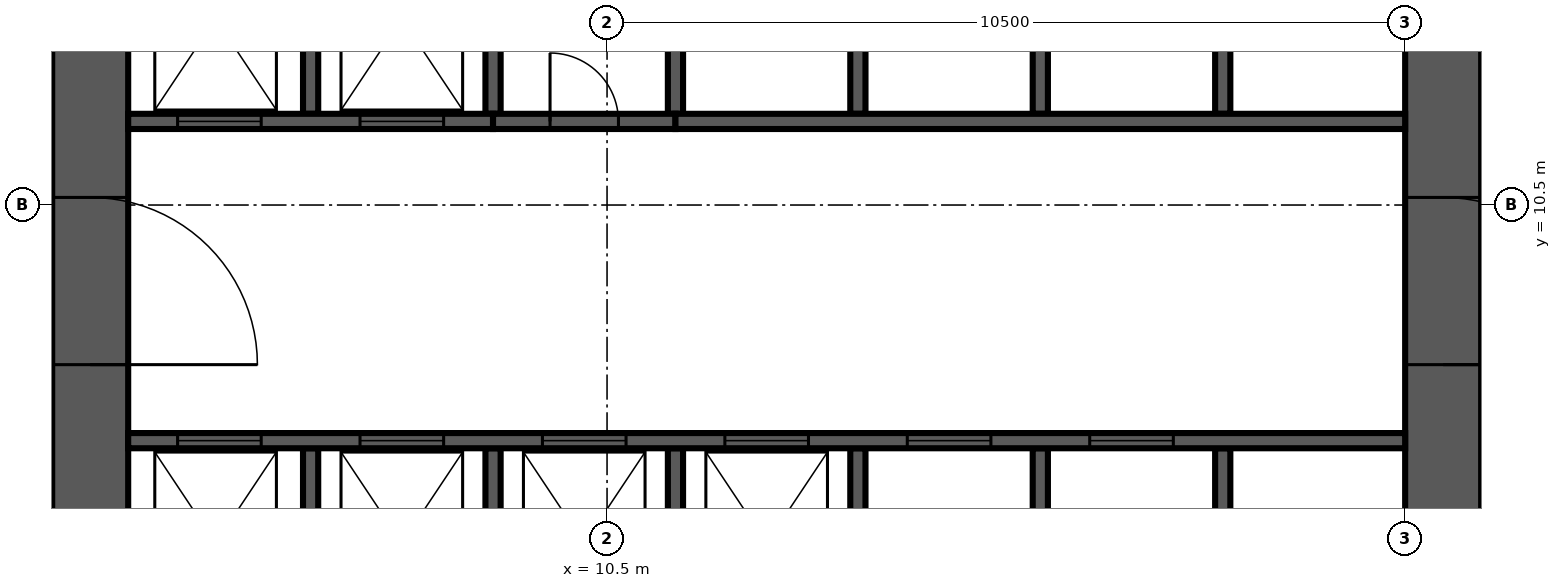
"""IFC4 building model, lengths in metres.
Left out: names, types, materials, properties, quantities, classifications, styles, units other than length and angle.
Written with IfcOpenShell. Run it as: python <this file> out.ifc"""

import sys

from ifc_helpers import new_model, si_unit, direction, frame, frame_2d, origin, place, context, subcontext, project, spatial, rectangle, extrude, source, transform, mapped, element, fill, save


model = new_model("IFC4")
c1 = context("Model", 3, precision=1e-05, world=origin(), true_north=direction((0.0, 1.0)))
c2 = subcontext(c1, "Body", "Model", "MODEL_VIEW")
j1 = project(units=[si_unit("LENGTHUNIT", "METRE"), si_unit("PLANEANGLEUNIT", "RADIAN")], contexts=[c1])
p1 = place(None, origin())
s1 = spatial("IfcSite", under=j1, at=p1, CompositionType="ELEMENT")
p2 = place(p1, origin())
s2 = spatial("IfcBuilding", under=s1, at=p2, CompositionType="ELEMENT")
p3 = place(p2, frame((0.0, 0.0, 170.3)))
s3 = spatial("IfcBuildingStorey", under=s2, at=p3, CompositionType="ELEMENT", Elevation=170.3)
p4 = place(p3, frame((3.7, 4.2, 0.0), z_axis=(0.0, 0.0, 1.0), x_axis=(0.0, 1.0, 0.0)))
e1 = element("IfcWall", 1, at=p4, inside=s3, PredefinedType="SHEAR", context=c2, shape_type="SweptSolid", body=[
    extrude(rectangle(XDim=17.8, YDim=1.0, at=frame_2d((8.9, 0.0))), origin(), (0.0, 0.0, 1.0), 7.5),
])
m1 = source(origin(), c2, "Body", "SweptSolid", [
    extrude(rectangle(XDim=2.2, YDim=2.1, at=frame_2d((1.1, 1.05))), frame((0.0, 0.51, 0.0), z_axis=(0.0, -1.0, 0.0), x_axis=(1.0, 0.0, 0.0)), (0.0, 0.0, 1.0), 1.02),
])
p5 = place(p4, frame((4.2, 0.0, 0.0)))
e2 = element("IfcOpeningElement", 2, at=p5, cuts=e1, PredefinedType="OPENING", context=c2, shape_type="MappedRepresentation", body=[
    mapped(m1, transform((0.0, 0.0, 0.0), scale=1.0)),
])
p6 = place(p3, frame((21.5, 4.2, 0.0), z_axis=(0.0, 0.0, 1.0), x_axis=(0.0, 1.0, 0.0)))
e3 = element("IfcWall", 3, at=p6, inside=s3, PredefinedType="SHEAR", context=c2, shape_type="SweptSolid", body=[
    extrude(rectangle(XDim=16.8, YDim=1.0, at=frame_2d((8.4, 0.0))), origin(), (0.0, 0.0, 1.0), 7.5),
])
p7 = place(p6, frame((4.2, 0.0, 0.0)))
e4 = element("IfcOpeningElement", 4, at=p7, cuts=e3, PredefinedType="OPENING", context=c2, shape_type="MappedRepresentation", body=[
    mapped(m1, transform((0.0, 0.0, 0.0), scale=1.0)),
])
m2 = source(origin(), c2, "Body", "SweptSolid", [
    extrude(rectangle(XDim=1.2, YDim=2.1, at=frame_2d((0.6, 1.05))), frame((0.0, 0.51, 0.0), z_axis=(0.0, -1.0, 0.0), x_axis=(1.0, 0.0, 0.0)), (0.0, 0.0, 1.0), 1.02),
])
p8 = place(p6, frame((14.7, 0.0, 0.0)))
e5 = element("IfcOpeningElement", 5, at=p8, cuts=e3, PredefinedType="OPENING", context=c2, shape_type="MappedRepresentation", body=[
    mapped(m2, transform((0.0, 0.0, 0.0), scale=1.0)),
])
m3 = source(origin(), c2, "Body", "SweptSolid", [
    extrude(rectangle(XDim=3.1, YDim=0.2, at=frame_2d((1.55, 0.0))), origin(), (0.0, 0.0, 1.0), 7.5),
])
for number, where, z_axis, x_axis in (
    (6, (6.6, 4.2, 0.0), (0.0, 0.0, 1.0), (0.0, 1.0, 0.0)),
    (7, (9.0, 4.2, 0.0), (0.0, 0.0, 1.0), (0.0, 1.0, 0.0)),
    (8, (11.4, 4.2, 0.0), (0.0, 0.0, 1.0), (0.0, 1.0, 0.0)),
    (9, (13.8, 4.2, 0.0), (0.0, 0.0, 1.0), (0.0, 1.0, 0.0)),
    (10, (16.2, 4.2, 0.0), (0.0, 0.0, 1.0), (0.0, 1.0, 0.0)),
    (11, (18.6, 4.2, 0.0), (0.0, 0.0, 1.0), (0.0, 1.0, 0.0)),
):
    element("IfcWall", number, at=place(p3, frame(where, z_axis=z_axis, x_axis=x_axis)), inside=s3, PredefinedType="SOLIDWALL", context=c2, shape_type="MappedRepresentation", body=[
        mapped(m3, transform((0.0, 0.0, 0.0), scale=1.0)),
    ])
m4 = source(origin(), c2, "Body", "SweptSolid", [
    extrude(rectangle(XDim=3.0, YDim=0.2, at=frame_2d((1.5, 0.0))), origin(), (0.0, 0.0, 1.0), 7.5),
])
p9 = place(p3, frame((6.6, 11.7, 0.0), z_axis=(0.0, 0.0, 1.0), x_axis=(0.0, 1.0, 0.0)))
e12 = element("IfcWall", 12, at=p9, inside=s3, PredefinedType="SOLIDWALL", context=c2, shape_type="MappedRepresentation", body=[
    mapped(m4, transform((0.0, 0.0, 0.0), scale=1.0)),
])
p10 = place(p3, frame((9.0, 11.7, 0.0), z_axis=(0.0, 0.0, 1.0), x_axis=(0.0, 1.0, 0.0)))
e13 = element("IfcWall", 13, at=p10, inside=s3, PredefinedType="SOLIDWALL", context=c2, shape_type="SweptSolid", body=[
    extrude(rectangle(XDim=3.0, YDim=0.2, at=frame_2d((1.5, 0.0))), origin(), (0.0, 0.0, 1.0), 7.1),
])
m5 = source(origin(), c2, "Body", "SweptSolid", [
    extrude(rectangle(XDim=3.0, YDim=0.2, at=frame_2d((1.5, 0.0))), origin(), (0.0, 0.0, 1.0), 7.1),
])
p11 = place(p3, frame((11.4, 11.7, 0.0), z_axis=(0.0, 0.0, 1.0), x_axis=(0.0, 1.0, 0.0)))
e14 = element("IfcWall", 14, at=p11, inside=s3, PredefinedType="SOLIDWALL", context=c2, shape_type="MappedRepresentation", body=[
    mapped(m5, transform((0.0, 0.0, 0.0), scale=1.0)),
])
for number, where, z_axis, x_axis in (
    (15, (13.8, 11.7, 0.0), (0.0, 0.0, 1.0), (0.0, 1.0, 0.0)),
    (16, (16.2, 11.7, 0.0), (0.0, 0.0, 1.0), (0.0, 1.0, 0.0)),
    (17, (18.6, 11.7, 0.0), (0.0, 0.0, 1.0), (0.0, 1.0, 0.0)),
):
    element("IfcWall", number, at=place(p3, frame(where, z_axis=z_axis, x_axis=x_axis)), inside=s3, PredefinedType="SOLIDWALL", context=c2, shape_type="MappedRepresentation", body=[
        mapped(m4, transform((0.0, 0.0, 0.0), scale=1.0)),
    ])
m6 = source(origin(), c2, "Body", "SweptSolid", [
    extrude(rectangle(XDim=16.8, YDim=0.2, at=frame_2d((8.4, 0.0))), origin(), (0.0, 0.0, 1.0), 7.5),
])
p12 = place(p3, frame((4.2, 7.4, 0.0), z_axis=(0.0, 0.0, 1.0), x_axis=(1.0, 0.0, 0.0)))
e18 = element("IfcWall", 18, at=p12, inside=s3, PredefinedType="SOLIDWALL", context=c2, shape_type="MappedRepresentation", body=[
    mapped(m6, transform((0.0, 0.0, 0.0), scale=1.0)),
])
m7 = source(origin(), c2, "Body", "SweptSolid", [
    extrude(rectangle(XDim=1.1, YDim=2.1, at=frame_2d((0.55, 1.05))), frame((0.0, 0.11, 0.0), z_axis=(0.0, -1.0, 0.0), x_axis=(1.0, 0.0, 0.0)), (0.0, 0.0, 1.0), 0.22),
])
p13 = place(p12, frame((0.65, 0.0, 0.0)))
e19 = element("IfcOpeningElement", 19, at=p13, cuts=e18, PredefinedType="OPENING", context=c2, shape_type="MappedRepresentation", body=[
    mapped(m7, transform((0.0, 0.0, 0.0), scale=1.0)),
])
p14 = place(p12, frame((3.05, 0.0, 0.0)))
e20 = element("IfcOpeningElement", 20, at=p14, cuts=e18, PredefinedType="OPENING", context=c2, shape_type="MappedRepresentation", body=[
    mapped(m7, transform((0.0, 0.0, 0.0), scale=1.0)),
])
p15 = place(p12, frame((5.45, 0.0, 0.0)))
e21 = element("IfcOpeningElement", 21, at=p15, cuts=e18, PredefinedType="OPENING", context=c2, shape_type="MappedRepresentation", body=[
    mapped(m7, transform((0.0, 0.0, 0.0), scale=1.0)),
])
p16 = place(p12, frame((7.85, 0.0, 0.0)))
e22 = element("IfcOpeningElement", 22, at=p16, cuts=e18, PredefinedType="OPENING", context=c2, shape_type="MappedRepresentation", body=[
    mapped(m7, transform((0.0, 0.0, 0.0), scale=1.0)),
])
p17 = place(p12, frame((10.25, 0.0, 0.0)))
e23 = element("IfcOpeningElement", 23, at=p17, cuts=e18, PredefinedType="OPENING", context=c2, shape_type="MappedRepresentation", body=[
    mapped(m7, transform((0.0, 0.0, 0.0), scale=1.0)),
])
p18 = place(p12, frame((12.65, 0.0, 0.0)))
e24 = element("IfcOpeningElement", 24, at=p18, cuts=e18, PredefinedType="OPENING", context=c2, shape_type="MappedRepresentation", body=[
    mapped(m7, transform((0.0, 0.0, 0.0), scale=1.0)),
])
p19 = place(p3, frame((4.2, 11.6, 0.0), z_axis=(0.0, 0.0, 1.0), x_axis=(1.0, 0.0, 0.0)))
e25 = element("IfcWall", 25, at=p19, inside=s3, PredefinedType="SOLIDWALL", context=c2, shape_type="SweptSolid", body=[
    extrude(rectangle(XDim=4.8, YDim=0.2, at=frame_2d((2.4, 0.0))), origin(), (0.0, 0.0, 1.0), 7.5),
])
p20 = place(p19, frame((0.65, 0.0, 0.0)))
e26 = element("IfcOpeningElement", 26, at=p20, cuts=e25, PredefinedType="OPENING", context=c2, shape_type="MappedRepresentation", body=[
    mapped(m7, transform((0.0, 0.0, 0.0), scale=1.0)),
])
p21 = place(p19, frame((3.05, 0.0, 0.0)))
e27 = element("IfcOpeningElement", 27, at=p21, cuts=e25, PredefinedType="OPENING", context=c2, shape_type="MappedRepresentation", body=[
    mapped(m7, transform((0.0, 0.0, 0.0), scale=1.0)),
])
p22 = place(p3, frame((9.0, 11.6, 0.0), z_axis=(0.0, 0.0, 1.0), x_axis=(1.0, 0.0, 0.0)))
e28 = element("IfcWall", 28, at=p22, inside=s3, PredefinedType="SOLIDWALL", context=c2, shape_type="SweptSolid", body=[
    extrude(rectangle(XDim=2.4, YDim=0.2, at=frame_2d((1.2, 0.0))), origin(), (0.0, 0.0, 1.0), 7.1),
])
m8 = source(origin(), c2, "Body", "SweptSolid", [
    extrude(rectangle(XDim=0.9, YDim=2.1, at=frame_2d((0.45, 1.05))), frame((0.0, 0.11, 0.0), z_axis=(0.0, -1.0, 0.0), x_axis=(1.0, 0.0, 0.0)), (0.0, 0.0, 1.0), 0.22),
])
p23 = place(p22, frame((0.75, 0.0, 0.0)))
e29 = element("IfcOpeningElement", 29, at=p23, cuts=e28, PredefinedType="OPENING", context=c2, shape_type="MappedRepresentation", body=[
    mapped(m8, transform((0.0, 0.0, 0.0), scale=1.0)),
])
p24 = place(p3, frame((11.4, 11.6, 0.0), z_axis=(0.0, 0.0, 1.0), x_axis=(1.0, 0.0, 0.0)))
e30 = element("IfcWall", 30, at=p24, inside=s3, PredefinedType="SOLIDWALL", context=c2, shape_type="SweptSolid", body=[
    extrude(rectangle(XDim=9.6, YDim=0.2, at=frame_2d((4.8, 0.0))), origin(), (0.0, 0.0, 1.0), 7.5),
])
m9 = source(origin(), c2, "Body", "SweptSolid", [
    extrude(rectangle(XDim=1.1, YDim=2.1, at=frame_2d((0.55, 1.05))), frame((0.0, 0.025, 0.0), z_axis=(0.0, -1.0, 0.0), x_axis=(1.0, 0.0, 0.0)), (0.0, 0.0, 1.0), 0.05),
])
p25 = place(p13, origin())
e31 = element("IfcDoor", 31, at=p25, inside=s3, OperationType="SLIDING_TO_LEFT", PredefinedType="DOOR", context=c2, shape_type="MappedRepresentation", body=[
    mapped(m9, transform((0.0, 0.0, 0.0), scale=1.0)),
])
fill(e19, e31)
p26 = place(p14, origin())
e32 = element("IfcDoor", 32, at=p26, inside=s3, OperationType="SLIDING_TO_LEFT", PredefinedType="DOOR", context=c2, shape_type="MappedRepresentation", body=[
    mapped(m9, transform((0.0, 0.0, 0.0), scale=1.0)),
])
fill(e20, e32)
p27 = place(p15, origin())
e33 = element("IfcDoor", 33, at=p27, inside=s3, OperationType="SLIDING_TO_LEFT", PredefinedType="DOOR", context=c2, shape_type="MappedRepresentation", body=[
    mapped(m9, transform((0.0, 0.0, 0.0), scale=1.0)),
])
fill(e21, e33)
p28 = place(p16, origin())
e34 = element("IfcDoor", 34, at=p28, inside=s3, OperationType="SLIDING_TO_LEFT", PredefinedType="DOOR", context=c2, shape_type="MappedRepresentation", body=[
    mapped(m9, transform((0.0, 0.0, 0.0), scale=1.0)),
])
fill(e22, e34)
p29 = place(p17, origin())
e35 = element("IfcDoor", 35, at=p29, inside=s3, OperationType="SLIDING_TO_LEFT", PredefinedType="DOOR", context=c2, shape_type="MappedRepresentation", body=[
    mapped(m9, transform((0.0, 0.0, 0.0), scale=1.0)),
])
fill(e23, e35)
p30 = place(p18, origin())
e36 = element("IfcDoor", 36, at=p30, inside=s3, OperationType="SLIDING_TO_LEFT", PredefinedType="DOOR", context=c2, shape_type="MappedRepresentation", body=[
    mapped(m9, transform((0.0, 0.0, 0.0), scale=1.0)),
])
fill(e24, e36)
p31 = place(p20, origin())
e37 = element("IfcDoor", 37, at=p31, inside=s3, OperationType="SLIDING_TO_LEFT", PredefinedType="DOOR", context=c2, shape_type="MappedRepresentation", body=[
    mapped(m9, transform((0.0, 0.0, 0.0), scale=1.0)),
])
fill(e26, e37)
p32 = place(p21, origin())
e38 = element("IfcDoor", 38, at=p32, inside=s3, OperationType="SLIDING_TO_LEFT", PredefinedType="DOOR", context=c2, shape_type="MappedRepresentation", body=[
    mapped(m9, transform((0.0, 0.0, 0.0), scale=1.0)),
])
fill(e27, e38)
m10 = source(origin(), c2, "Body", "SweptSolid", [
    extrude(rectangle(XDim=0.9, YDim=2.1, at=frame_2d((0.45, 1.05))), frame((0.0, 0.025, 0.0), z_axis=(0.0, -1.0, 0.0), x_axis=(1.0, 0.0, 0.0)), (0.0, 0.0, 1.0), 0.05),
])
p33 = place(p23, origin())
e39 = element("IfcDoor", 39, at=p33, inside=s3, OperationType="SINGLE_SWING_LEFT", PredefinedType="DOOR", context=c2, shape_type="MappedRepresentation", body=[
    mapped(m10, transform((0.0, 0.0, 0.0), scale=1.0)),
])
fill(e29, e39)
m11 = source(origin(), c2, "Body", "SweptSolid", [
    extrude(rectangle(XDim=2.2, YDim=2.1, at=frame_2d((1.1, 1.05))), frame((0.0, 0.025, 0.0), z_axis=(0.0, -1.0, 0.0), x_axis=(1.0, 0.0, 0.0)), (0.0, 0.0, 1.0), 0.05),
])
p34 = place(p7, origin())
e40 = element("IfcDoor", 40, at=p34, inside=s3, OperationType="DOUBLE_DOOR_SINGLE_SWING", PredefinedType="DOOR", context=c2, shape_type="MappedRepresentation", body=[
    mapped(m11, transform((0.0, 0.0, 0.0), scale=1.0)),
])
fill(e4, e40)
p35 = place(p5, origin())
e41 = element("IfcDoor", 41, at=p35, inside=s3, OperationType="DOUBLE_DOOR_SINGLE_SWING", PredefinedType="DOOR", context=c2, shape_type="MappedRepresentation", body=[
    mapped(m11, transform((0.0, 0.0, 0.0), scale=1.0)),
])
fill(e2, e41)
save(model, sys.argv[1])
